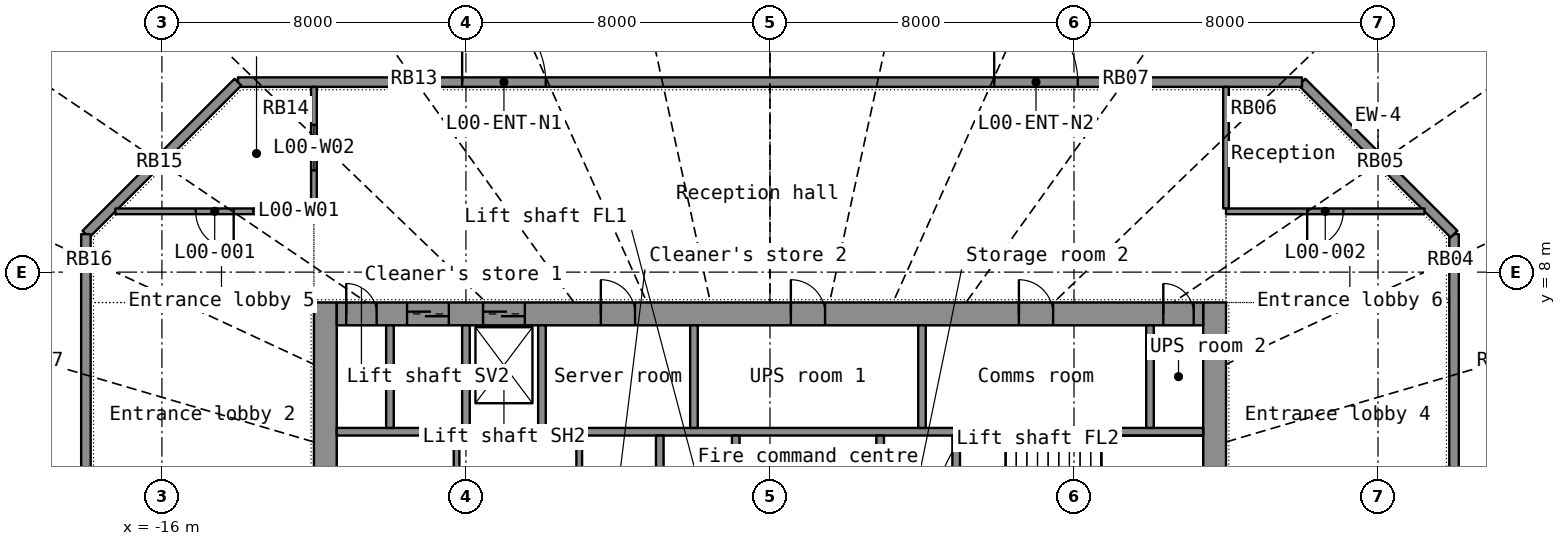
"""IFC4 building model, lengths in metres.
Left out: names, types, materials, properties, quantities, classifications, styles, units other than length and angle.
Written with IfcOpenShell. Run it as: python <this file> out.ifc"""

import sys

from ifc_helpers import new_model, si_unit, direction, frame, frame_2d, origin, place, context, subcontext, project, spatial, rectangle, extrude, element, fill, save


model = new_model("IFC4")
c1 = context("Model", 3, precision=1e-05, world=origin(), true_north=direction((0.0, 1.0)))
c2 = subcontext(c1, "Body", "Model", "MODEL_VIEW")
j1 = project(units=[si_unit("LENGTHUNIT", "METRE"), si_unit("PLANEANGLEUNIT", "RADIAN")], contexts=[c1])
p1 = place(None, origin())
s1 = spatial("IfcSite", under=j1, at=p1, CompositionType="ELEMENT")
p2 = place(p1, origin())
s2 = spatial("IfcBuilding", under=s1, at=p2, CompositionType="ELEMENT")
p3 = place(p2, origin())
s3 = spatial("IfcBuildingStorey", under=s2, at=p3, CompositionType="ELEMENT", Elevation=0.0)
p4 = place(p3, frame((18.0, 9.0, 0.0), z_axis=(0.0, 0.0, 1.0), x_axis=(0.0, -1.0, 0.0)))
e1 = element("IfcWall", 1, at=p4, inside=s3, PredefinedType="STANDARD", context=c2, shape_type="SweptSolid", body=[
    extrude(rectangle(XDim=18.0, YDim=0.25, at=frame_2d((9.0, 0.0))), origin(), (0.0, 0.0, 1.0), 6.6),
])
p5 = place(p4, frame((7.9, 0.0, 0.0)))
e2 = element("IfcOpeningElement", 2, at=p5, cuts=e1, PredefinedType="OPENING", context=c2, shape_type="SweptSolid", body=[
    extrude(rectangle(XDim=2.2, YDim=2.4, at=frame_2d((1.1, 1.2))), frame((0.0, 0.135, 0.0), z_axis=(0.0, -1.0, 0.0), x_axis=(1.0, 0.0, 0.0)), (0.0, 0.0, 1.0), 0.27),
])
p6 = place(p3, frame((14.0, 13.0, 0.0), z_axis=(0.0, 0.0, 1.0), x_axis=(0.707106781, -0.707106781, 0.0)))
e3 = element("IfcWall", 3, at=p6, inside=s3, PredefinedType="STANDARD", context=c2, shape_type="SweptSolid", body=[
    extrude(rectangle(XDim=5.657, YDim=0.25, at=frame_2d((2.828, 0.0))), origin(), (0.0, 0.0, 1.0), 6.6),
])
p7 = place(p3, frame((-14.0, 13.0, 0.0), z_axis=(0.0, 0.0, 1.0), x_axis=(1.0, 0.0, 0.0)))
e4 = element("IfcWall", 4, at=p7, inside=s3, PredefinedType="STANDARD", context=c2, shape_type="SweptSolid", body=[
    extrude(rectangle(XDim=28.0, YDim=0.25, at=frame_2d((14.0, 0.0))), origin(), (0.0, 0.0, 1.0), 6.6),
])
p8 = place(p7, frame((5.9, 0.0, 0.0)))
e5 = element("IfcOpeningElement", 5, at=p8, cuts=e4, PredefinedType="OPENING", context=c2, shape_type="SweptSolid", body=[
    extrude(rectangle(XDim=2.2, YDim=2.4, at=frame_2d((1.1, 1.2))), frame((0.0, 0.135, 0.0), z_axis=(0.0, -1.0, 0.0), x_axis=(1.0, 0.0, 0.0)), (0.0, 0.0, 1.0), 0.27),
])
p9 = place(p7, frame((19.9, 0.0, 0.0)))
e6 = element("IfcOpeningElement", 6, at=p9, cuts=e4, PredefinedType="OPENING", context=c2, shape_type="SweptSolid", body=[
    extrude(rectangle(XDim=2.2, YDim=2.4, at=frame_2d((1.1, 1.2))), frame((0.0, 0.135, 0.0), z_axis=(0.0, -1.0, 0.0), x_axis=(1.0, 0.0, 0.0)), (0.0, 0.0, 1.0), 0.27),
])
p10 = place(p3, frame((-18.0, 9.0, 0.0), z_axis=(0.0, 0.0, 1.0), x_axis=(0.707106781, 0.707106781, 0.0)))
e7 = element("IfcWall", 7, at=p10, inside=s3, PredefinedType="STANDARD", context=c2, shape_type="SweptSolid", body=[
    extrude(rectangle(XDim=5.657, YDim=0.25, at=frame_2d((2.828, 0.0))), origin(), (0.0, 0.0, 1.0), 6.6),
])
p11 = place(p3, frame((-18.0, -9.0, 0.0), z_axis=(0.0, 0.0, 1.0), x_axis=(0.0, 1.0, 0.0)))
e8 = element("IfcWall", 8, at=p11, inside=s3, PredefinedType="STANDARD", context=c2, shape_type="SweptSolid", body=[
    extrude(rectangle(XDim=18.0, YDim=0.25, at=frame_2d((9.0, 0.0))), origin(), (0.0, 0.0, 1.0), 6.6),
])
p12 = place(p11, frame((7.9, 0.0, 0.0)))
e9 = element("IfcOpeningElement", 9, at=p12, cuts=e8, PredefinedType="OPENING", context=c2, shape_type="SweptSolid", body=[
    extrude(rectangle(XDim=2.2, YDim=2.4, at=frame_2d((1.1, 1.2))), frame((0.0, 0.135, 0.0), z_axis=(0.0, -1.0, 0.0), x_axis=(1.0, 0.0, 0.0)), (0.0, 0.0, 1.0), 0.27),
])
p13 = place(p3, frame((-11.7, -7.2, 0.0), z_axis=(0.0, 0.0, 1.0), x_axis=(0.0, 1.0, 0.0)))
e10 = element("IfcWall", 10, at=p13, inside=s3, PredefinedType="SHEAR", context=c2, shape_type="SweptSolid", body=[
    extrude(rectangle(XDim=14.4, YDim=0.6, at=frame_2d((7.2, 0.0))), origin(), (0.0, 0.0, 1.0), 6.6),
])
p14 = place(p13, frame((6.5, 0.0, 0.0)))
e11 = element("IfcOpeningElement", 11, at=p14, cuts=e10, PredefinedType="OPENING", context=c2, shape_type="SweptSolid", body=[
    extrude(rectangle(XDim=1.4, YDim=2.2, at=frame_2d((0.7, 1.1))), frame((0.0, 0.31, 0.0), z_axis=(0.0, -1.0, 0.0), x_axis=(1.0, 0.0, 0.0)), (0.0, 0.0, 1.0), 0.62),
])
p15 = place(p3, frame((11.7, -7.2, 0.0), z_axis=(0.0, 0.0, 1.0), x_axis=(0.0, 1.0, 0.0)))
e12 = element("IfcWall", 12, at=p15, inside=s3, PredefinedType="SHEAR", context=c2, shape_type="SweptSolid", body=[
    extrude(rectangle(XDim=14.4, YDim=0.6, at=frame_2d((7.2, 0.0))), origin(), (0.0, 0.0, 1.0), 6.6),
])
p16 = place(p15, frame((6.5, 0.0, 0.0)))
e13 = element("IfcOpeningElement", 13, at=p16, cuts=e12, PredefinedType="OPENING", context=c2, shape_type="SweptSolid", body=[
    extrude(rectangle(XDim=1.4, YDim=2.2, at=frame_2d((0.7, 1.1))), frame((0.0, 0.31, 0.0), z_axis=(0.0, -1.0, 0.0), x_axis=(1.0, 0.0, 0.0)), (0.0, 0.0, 1.0), 0.62),
])
p17 = place(p3, frame((-11.4, 6.9, 0.0), z_axis=(0.0, 0.0, 1.0), x_axis=(1.0, 0.0, 0.0)))
e14 = element("IfcWall", 14, at=p17, inside=s3, PredefinedType="SHEAR", context=c2, shape_type="SweptSolid", body=[
    extrude(rectangle(XDim=22.8, YDim=0.6, at=frame_2d((11.4, 0.0))), origin(), (0.0, 0.0, 1.0), 6.6),
])
p18 = place(p17, frame((1.85, 0.0, 0.0)))
e15 = element("IfcOpeningElement", 15, at=p18, cuts=e14, PredefinedType="OPENING", context=c2, shape_type="SweptSolid", body=[
    extrude(rectangle(XDim=1.1, YDim=2.2, at=frame_2d((0.55, 1.1))), frame((0.0, 0.31, 0.0), z_axis=(0.0, -1.0, 0.0), x_axis=(1.0, 0.0, 0.0)), (0.0, 0.0, 1.0), 0.62),
])
p19 = place(p17, frame((3.85, 0.0, 0.0)))
e16 = element("IfcOpeningElement", 16, at=p19, cuts=e14, PredefinedType="OPENING", context=c2, shape_type="SweptSolid", body=[
    extrude(rectangle(XDim=1.1, YDim=2.2, at=frame_2d((0.55, 1.1))), frame((0.0, 0.31, 0.0), z_axis=(0.0, -1.0, 0.0), x_axis=(1.0, 0.0, 0.0)), (0.0, 0.0, 1.0), 0.62),
])
p20 = place(p17, frame((6.95, 0.0, 0.0)))
e17 = element("IfcOpeningElement", 17, at=p20, cuts=e14, PredefinedType="OPENING", context=c2, shape_type="SweptSolid", body=[
    extrude(rectangle(XDim=0.9, YDim=2.1, at=frame_2d((0.45, 1.05))), frame((0.0, 0.31, 0.0), z_axis=(0.0, -1.0, 0.0), x_axis=(1.0, 0.0, 0.0)), (0.0, 0.0, 1.0), 0.62),
])
p21 = place(p17, frame((11.95, 0.0, 0.0)))
e18 = element("IfcOpeningElement", 18, at=p21, cuts=e14, PredefinedType="OPENING", context=c2, shape_type="SweptSolid", body=[
    extrude(rectangle(XDim=0.9, YDim=2.1, at=frame_2d((0.45, 1.05))), frame((0.0, 0.31, 0.0), z_axis=(0.0, -1.0, 0.0), x_axis=(1.0, 0.0, 0.0)), (0.0, 0.0, 1.0), 0.62),
])
p22 = place(p17, frame((17.95, 0.0, 0.0)))
e19 = element("IfcOpeningElement", 19, at=p22, cuts=e14, PredefinedType="OPENING", context=c2, shape_type="SweptSolid", body=[
    extrude(rectangle(XDim=0.9, YDim=2.1, at=frame_2d((0.45, 1.05))), frame((0.0, 0.31, 0.0), z_axis=(0.0, -1.0, 0.0), x_axis=(1.0, 0.0, 0.0)), (0.0, 0.0, 1.0), 0.62),
])
p23 = place(p17, frame((0.25, 0.0, 0.0)))
e20 = element("IfcOpeningElement", 20, at=p23, cuts=e14, PredefinedType="OPENING", context=c2, shape_type="SweptSolid", body=[
    extrude(rectangle(XDim=0.8, YDim=2.05, at=frame_2d((0.4, 1.025))), frame((0.0, 0.31, 0.0), z_axis=(0.0, -1.0, 0.0), x_axis=(1.0, 0.0, 0.0)), (0.0, 0.0, 1.0), 0.62),
])
p24 = place(p17, frame((21.75, 0.0, 0.0)))
e21 = element("IfcOpeningElement", 21, at=p24, cuts=e14, PredefinedType="OPENING", context=c2, shape_type="SweptSolid", body=[
    extrude(rectangle(XDim=0.8, YDim=2.05, at=frame_2d((0.4, 1.025))), frame((0.0, 0.31, 0.0), z_axis=(0.0, -1.0, 0.0), x_axis=(1.0, 0.0, 0.0)), (0.0, 0.0, 1.0), 0.62),
])
p25 = place(p3, frame((-11.4, 3.8, 0.0), z_axis=(0.0, 0.0, 1.0), x_axis=(1.0, 0.0, 0.0)))
e22 = element("IfcWall", 22, at=p25, inside=s3, PredefinedType="SHEAR", context=c2, shape_type="SweptSolid", body=[
    extrude(rectangle(XDim=22.8, YDim=0.2, at=frame_2d((11.4, 0.0))), origin(), (0.0, 0.0, 1.0), 6.6),
])
for number, where, z_axis, x_axis in (
    (23, (-10.0, 3.9, 0.0), (0.0, 0.0, 1.0), (0.0, 1.0, 0.0)),
    (24, (-8.0, 3.9, 0.0), (0.0, 0.0, 1.0), (0.0, 1.0, 0.0)),
    (25, (-6.0, 3.9, 0.0), (0.0, 0.0, 1.0), (0.0, 1.0, 0.0)),
    (26, (10.0, 3.9, 0.0), (0.0, 0.0, 1.0), (0.0, 1.0, 0.0)),
):
    element("IfcWall", number, at=place(p3, frame(where, z_axis=z_axis, x_axis=x_axis)), inside=s3, PredefinedType="SHEAR", context=c2, shape_type="SweptSolid", body=[
        extrude(rectangle(XDim=2.7, YDim=0.2, at=frame_2d((1.35, 0.0))), origin(), (0.0, 0.0, 1.0), 6.6),
    ])
for number, where, z_axis, x_axis in (
    (27, (-2.0, 3.9, 0.0), (0.0, 0.0, 1.0), (0.0, 1.0, 0.0)),
    (28, (4.0, 3.9, 0.0), (0.0, 0.0, 1.0), (0.0, 1.0, 0.0)),
):
    element("IfcWall", number, at=place(p3, frame(where, z_axis=z_axis, x_axis=x_axis)), inside=s3, PredefinedType="PARTITIONING", context=c2, shape_type="SweptSolid", body=[
        extrude(rectangle(XDim=2.7, YDim=0.2, at=frame_2d((1.35, 0.0))), origin(), (0.0, 0.0, 1.0), 6.6),
    ])
p26 = place(p3, frame((-2.9, -3.7, 0.0), z_axis=(0.0, 0.0, 1.0), x_axis=(0.0, 1.0, 0.0)))
e29 = element("IfcWall", 29, at=p26, inside=s3, PredefinedType="SHEAR", context=c2, shape_type="SweptSolid", body=[
    extrude(rectangle(XDim=7.4, YDim=0.2, at=frame_2d((3.7, 0.0))), origin(), (0.0, 0.0, 1.0), 6.6),
])
p27 = place(p26, frame((3.1, 0.0, 0.0)))
e30 = element("IfcOpeningElement", 30, at=p27, cuts=e29, PredefinedType="OPENING", context=c2, shape_type="SweptSolid", body=[
    extrude(rectangle(XDim=1.2, YDim=2.2, at=frame_2d((0.6, 1.1))), frame((0.0, 0.11, 0.0), z_axis=(0.0, -1.0, 0.0), x_axis=(1.0, 0.0, 0.0)), (0.0, 0.0, 1.0), 0.22),
])
p28 = place(p3, frame((2.9, -3.7, 0.0), z_axis=(0.0, 0.0, 1.0), x_axis=(0.0, 1.0, 0.0)))
e31 = element("IfcWall", 31, at=p28, inside=s3, PredefinedType="SHEAR", context=c2, shape_type="SweptSolid", body=[
    extrude(rectangle(XDim=7.4, YDim=0.2, at=frame_2d((3.7, 0.0))), origin(), (0.0, 0.0, 1.0), 6.6),
])
p29 = place(p28, frame((3.1, 0.0, 0.0)))
e32 = element("IfcOpeningElement", 32, at=p29, cuts=e31, PredefinedType="OPENING", context=c2, shape_type="SweptSolid", body=[
    extrude(rectangle(XDim=1.2, YDim=2.2, at=frame_2d((0.6, 1.1))), frame((0.0, 0.11, 0.0), z_axis=(0.0, -1.0, 0.0), x_axis=(1.0, 0.0, 0.0)), (0.0, 0.0, 1.0), 0.22),
])
for number, where, z_axis, x_axis in (
    (33, (-0.9, 1.35, 0.0), (0.0, 0.0, 1.0), (0.0, 1.0, 0.0)),
    (34, (4.9, 1.35, 0.0), (0.0, 0.0, 1.0), (0.0, 1.0, 0.0)),
):
    element("IfcWall", number, at=place(p3, frame(where, z_axis=z_axis, x_axis=x_axis)), inside=s3, PredefinedType="SHEAR", context=c2, shape_type="SweptSolid", body=[
        extrude(rectangle(XDim=2.35, YDim=0.2, at=frame_2d((1.175, 0.0))), origin(), (0.0, 0.0, 1.0), 6.6),
    ])
for number, where, z_axis, x_axis in (
    (35, (-8.247, 1.35, 0.0), (0.0, 0.0, 1.0), (0.0, 1.0, 0.0)),
    (36, (-5.019, 1.35, 0.0), (0.0, 0.0, 1.0), (0.0, 1.0, 0.0)),
):
    element("IfcWall", number, at=place(p3, frame(where, z_axis=z_axis, x_axis=x_axis)), inside=s3, PredefinedType="PARTITIONING", context=c2, shape_type="SweptSolid", body=[
        extrude(rectangle(XDim=2.35, YDim=0.15, at=frame_2d((1.175, 0.0))), origin(), (0.0, 0.0, 1.0), 6.6),
    ])
p30 = place(p3, frame((-12.0, 9.6, 0.0), z_axis=(0.0, 0.0, 1.0), x_axis=(-1.0, 0.0, 0.0)))
e37 = element("IfcWall", 37, at=p30, inside=s3, PredefinedType="PARTITIONING", context=c2, shape_type="SweptSolid", body=[
    extrude(rectangle(XDim=5.223, YDim=0.15, at=frame_2d((2.612, 0.0))), origin(), (0.0, 0.0, 1.0), 5.6),
])
p31 = place(p30, frame((2.112, 0.0, 0.0)))
e38 = element("IfcOpeningElement", 38, at=p31, cuts=e37, PredefinedType="OPENING", context=c2, shape_type="SweptSolid", body=[
    extrude(rectangle(XDim=1.0, YDim=2.2, at=frame_2d((0.5, 1.1))), frame((0.0, 0.085, 0.0), z_axis=(0.0, -1.0, 0.0), x_axis=(1.0, 0.0, 0.0)), (0.0, 0.0, 1.0), 0.17),
])
p32 = place(p30, frame((0.4, 0.0, 1.0)))
e39 = element("IfcOpeningElement", 39, at=p32, cuts=e37, PredefinedType="OPENING", context=c2, shape_type="SweptSolid", body=[
    extrude(rectangle(XDim=1.2, YDim=1.0, at=frame_2d((0.6, 0.5))), frame((0.0, 0.085, 0.0), z_axis=(0.0, -1.0, 0.0), x_axis=(1.0, 0.0, 0.0)), (0.0, 0.0, 1.0), 0.17),
])
p33 = place(p3, frame((17.223, 9.6, 0.0), z_axis=(0.0, 0.0, 1.0), x_axis=(-1.0, 0.0, 0.0)))
e40 = element("IfcWall", 40, at=p33, inside=s3, PredefinedType="PARTITIONING", context=c2, shape_type="SweptSolid", body=[
    extrude(rectangle(XDim=5.223, YDim=0.15, at=frame_2d((2.612, 0.0))), origin(), (0.0, 0.0, 1.0), 5.6),
])
p34 = place(p33, frame((2.137, 0.0, 0.0)))
e41 = element("IfcOpeningElement", 41, at=p34, cuts=e40, PredefinedType="OPENING", context=c2, shape_type="SweptSolid", body=[
    extrude(rectangle(XDim=0.95, YDim=2.15, at=frame_2d((0.475, 1.075))), frame((0.0, 0.085, 0.0), z_axis=(0.0, -1.0, 0.0), x_axis=(1.0, 0.0, 0.0)), (0.0, 0.0, 1.0), 0.17),
])
p35 = place(p3, frame((-12.0, 12.875, 0.0), z_axis=(0.0, 0.0, 1.0), x_axis=(0.0, -1.0, 0.0)))
e42 = element("IfcWall", 42, at=p35, inside=s3, PredefinedType="PARTITIONING", context=c2, shape_type="SweptSolid", body=[
    extrude(rectangle(XDim=3.198, YDim=0.15, at=frame_2d((1.599, 0.0))), origin(), (0.0, 0.0, 1.0), 5.6),
])
p36 = place(p35, frame((0.999, 0.0, 1.0)))
e43 = element("IfcOpeningElement", 43, at=p36, cuts=e42, PredefinedType="OPENING", context=c2, shape_type="SweptSolid", body=[
    extrude(rectangle(XDim=1.2, YDim=1.0, at=frame_2d((0.6, 0.5))), frame((0.0, 0.085, 0.0), z_axis=(0.0, -1.0, 0.0), x_axis=(1.0, 0.0, 0.0)), (0.0, 0.0, 1.0), 0.17),
])
p37 = place(p3, frame((12.0, 9.677, 0.0), z_axis=(0.0, 0.0, 1.0), x_axis=(0.0, 1.0, 0.0)))
e44 = element("IfcWall", 44, at=p37, inside=s3, PredefinedType="PARTITIONING", context=c2, shape_type="SweptSolid", body=[
    extrude(rectangle(XDim=3.198, YDim=0.15, at=frame_2d((1.599, 0.0))), origin(), (0.0, 0.0, 1.0), 5.6),
])
p38 = place(p8, origin())
e45 = element("IfcDoor", 45, at=p38, inside=s3, OperationType="DOUBLE_DOOR_SINGLE_SWING", PredefinedType="DOOR", context=c2, shape_type="SweptSolid", body=[
    extrude(rectangle(XDim=2.2, YDim=2.4, at=frame_2d((1.1, 1.2))), frame((0.0, 0.025, 0.0), z_axis=(0.0, -1.0, 0.0), x_axis=(1.0, 0.0, 0.0)), (0.0, 0.0, 1.0), 0.05),
])
fill(e5, e45)
p39 = place(p9, origin())
e46 = element("IfcDoor", 46, at=p39, inside=s3, OperationType="DOUBLE_DOOR_SINGLE_SWING", PredefinedType="DOOR", context=c2, shape_type="SweptSolid", body=[
    extrude(rectangle(XDim=2.2, YDim=2.4, at=frame_2d((1.1, 1.2))), frame((0.0, 0.025, 0.0), z_axis=(0.0, -1.0, 0.0), x_axis=(1.0, 0.0, 0.0)), (0.0, 0.0, 1.0), 0.05),
])
fill(e6, e46)
p40 = place(p18, origin())
e47 = element("IfcDoor", 47, at=p40, inside=s3, OperationType="DOUBLE_DOOR_SLIDING", PredefinedType="DOOR", context=c2, shape_type="SweptSolid", body=[
    extrude(rectangle(XDim=1.1, YDim=2.2, at=frame_2d((0.55, 1.1))), frame((0.0, 0.025, 0.0), z_axis=(0.0, -1.0, 0.0), x_axis=(1.0, 0.0, 0.0)), (0.0, 0.0, 1.0), 0.05),
])
fill(e15, e47)
p41 = place(p19, origin())
e48 = element("IfcDoor", 48, at=p41, inside=s3, OperationType="DOUBLE_DOOR_SLIDING", PredefinedType="DOOR", context=c2, shape_type="SweptSolid", body=[
    extrude(rectangle(XDim=1.1, YDim=2.2, at=frame_2d((0.55, 1.1))), frame((0.0, 0.025, 0.0), z_axis=(0.0, -1.0, 0.0), x_axis=(1.0, 0.0, 0.0)), (0.0, 0.0, 1.0), 0.05),
])
fill(e16, e48)
p42 = place(p20, origin())
e49 = element("IfcDoor", 49, at=p42, inside=s3, OperationType="SINGLE_SWING_LEFT", PredefinedType="DOOR", context=c2, shape_type="SweptSolid", body=[
    extrude(rectangle(XDim=0.9, YDim=2.1, at=frame_2d((0.45, 1.05))), frame((0.0, 0.025, 0.0), z_axis=(0.0, -1.0, 0.0), x_axis=(1.0, 0.0, 0.0)), (0.0, 0.0, 1.0), 0.05),
])
fill(e17, e49)
p43 = place(p21, origin())
e50 = element("IfcDoor", 50, at=p43, inside=s3, OperationType="SINGLE_SWING_LEFT", PredefinedType="DOOR", context=c2, shape_type="SweptSolid", body=[
    extrude(rectangle(XDim=0.9, YDim=2.1, at=frame_2d((0.45, 1.05))), frame((0.0, 0.025, 0.0), z_axis=(0.0, -1.0, 0.0), x_axis=(1.0, 0.0, 0.0)), (0.0, 0.0, 1.0), 0.05),
])
fill(e18, e50)
p44 = place(p22, origin())
e51 = element("IfcDoor", 51, at=p44, inside=s3, OperationType="SINGLE_SWING_LEFT", PredefinedType="DOOR", context=c2, shape_type="SweptSolid", body=[
    extrude(rectangle(XDim=0.9, YDim=2.1, at=frame_2d((0.45, 1.05))), frame((0.0, 0.025, 0.0), z_axis=(0.0, -1.0, 0.0), x_axis=(1.0, 0.0, 0.0)), (0.0, 0.0, 1.0), 0.05),
])
fill(e19, e51)
p45 = place(p23, origin())
e52 = element("IfcDoor", 52, at=p45, inside=s3, OperationType="SINGLE_SWING_LEFT", PredefinedType="DOOR", context=c2, shape_type="SweptSolid", body=[
    extrude(rectangle(XDim=0.8, YDim=2.05, at=frame_2d((0.4, 1.025))), frame((0.0, 0.025, 0.0), z_axis=(0.0, -1.0, 0.0), x_axis=(1.0, 0.0, 0.0)), (0.0, 0.0, 1.0), 0.05),
])
fill(e20, e52)
p46 = place(p24, origin())
e53 = element("IfcDoor", 53, at=p46, inside=s3, OperationType="SINGLE_SWING_LEFT", PredefinedType="DOOR", context=c2, shape_type="SweptSolid", body=[
    extrude(rectangle(XDim=0.8, YDim=2.05, at=frame_2d((0.4, 1.025))), frame((0.0, 0.025, 0.0), z_axis=(0.0, -1.0, 0.0), x_axis=(1.0, 0.0, 0.0)), (0.0, 0.0, 1.0), 0.05),
])
fill(e21, e53)
p47 = place(p31, origin())
e54 = element("IfcDoor", 54, at=p47, inside=s3, OperationType="SINGLE_SWING_LEFT", PredefinedType="DOOR", context=c2, shape_type="SweptSolid", body=[
    extrude(rectangle(XDim=1.0, YDim=2.2, at=frame_2d((0.5, 1.1))), frame((0.0, 0.025, 0.0), z_axis=(0.0, -1.0, 0.0), x_axis=(1.0, 0.0, 0.0)), (0.0, 0.0, 1.0), 0.05),
])
fill(e38, e54)
p48 = place(p34, origin())
e55 = element("IfcDoor", 55, at=p48, inside=s3, OperationType="SINGLE_SWING_RIGHT", PredefinedType="DOOR", context=c2, shape_type="SweptSolid", body=[
    extrude(rectangle(XDim=0.95, YDim=2.15, at=frame_2d((0.475, 1.075))), frame((0.0, 0.025, 0.0), z_axis=(0.0, -1.0, 0.0), x_axis=(1.0, 0.0, 0.0)), (0.0, 0.0, 1.0), 0.05),
])
fill(e41, e55)
p49 = place(p32, origin())
e56 = element("IfcWindow", 56, at=p49, inside=s3, PartitioningType="SINGLE_PANEL", PredefinedType="WINDOW", context=c2, shape_type="SweptSolid", body=[
    extrude(rectangle(XDim=1.2, YDim=1.0, at=frame_2d((0.6, 0.5))), frame((0.0, 0.03, 0.0), z_axis=(0.0, -1.0, 0.0), x_axis=(1.0, 0.0, 0.0)), (0.0, 0.0, 1.0), 0.06),
])
fill(e39, e56)
p50 = place(p36, origin())
e57 = element("IfcWindow", 57, at=p50, inside=s3, PartitioningType="SINGLE_PANEL", PredefinedType="WINDOW", context=c2, shape_type="SweptSolid", body=[
    extrude(rectangle(XDim=1.2, YDim=1.0, at=frame_2d((0.6, 0.5))), frame((0.0, 0.03, 0.0), z_axis=(0.0, -1.0, 0.0), x_axis=(1.0, 0.0, 0.0)), (0.0, 0.0, 1.0), 0.06),
])
fill(e43, e57)
save(model, sys.argv[1])
